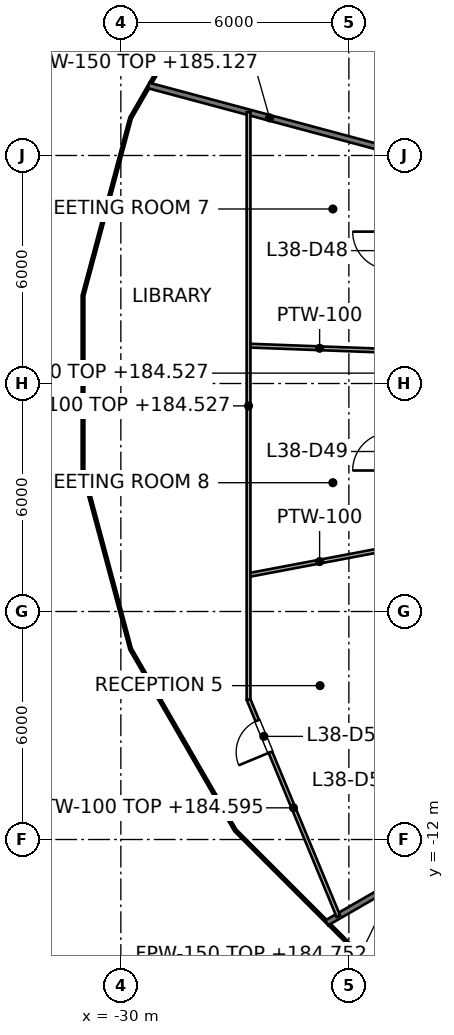
"""IFC4 building model, lengths in metres.
Left out: names, types, materials, properties, quantities, classifications, styles, units other than length and angle.
Written with IfcOpenShell. Run it as: python <this file> out.ifc"""

import sys

from ifc_helpers import new_model, si_unit, direction, frame, frame_2d, origin, place, context, subcontext, project, spatial, rectangle, extrude, element, fill, save


model = new_model("IFC4")
c1 = context("Model", 3, precision=1e-05, world=origin(), true_north=direction((0.0, 1.0)))
c2 = subcontext(c1, "Body", "Model", "MODEL_VIEW")
j1 = project(units=[si_unit("LENGTHUNIT", "METRE"), si_unit("PLANEANGLEUNIT", "RADIAN")], contexts=[c1])
p1 = place(None, origin())
s1 = spatial("IfcSite", under=j1, at=p1, CompositionType="ELEMENT")
p2 = place(p1, origin())
s2 = spatial("IfcBuilding", under=s1, at=p2, CompositionType="ELEMENT")
p3 = place(p2, frame((0.0, 0.0, 181.6)))
s3 = spatial("IfcBuildingStorey", under=s2, at=p3, CompositionType="ELEMENT", Elevation=181.6)
p4 = place(p3, frame((-29.272, 7.843, 0.0), z_axis=(0.0, 0.0, 1.0), x_axis=(0.965939462112, -0.258768150157, 0.0)))
e1 = element("IfcWall", 1, at=p4, inside=s3, PredefinedType="PARTITIONING", context=c2, shape_type="SweptSolid", body=[
    extrude(rectangle(XDim=6.597, YDim=0.15, at=frame_2d((3.298, 0.0))), origin(), (0.0, 0.0, 1.0), 3.527),
])
p5 = place(p3, frame((-24.583, -14.193, 0.0), z_axis=(0.0, 0.0, 1.0), x_axis=(0.866294951489, 0.499532838785, 0.0)))
e2 = element("IfcWall", 2, at=p5, inside=s3, PredefinedType="PARTITIONING", context=c2, shape_type="SweptSolid", body=[
    extrude(rectangle(XDim=4.125, YDim=0.15, at=frame_2d((2.062, 0.0))), origin(), (0.0, 0.0, 1.0), 3.152),
])
p6 = place(p3, frame((-26.64, -8.316, 0.0), z_axis=(0.0, 0.0, 1.0), x_axis=(0.382861877987, -0.923805597723, 0.0)))
e3 = element("IfcWall", 3, at=p6, inside=s3, PredefinedType="PARTITIONING", context=c2, shape_type="SweptSolid", body=[
    extrude(rectangle(XDim=6.171, YDim=0.1, at=frame_2d((3.086, 0.0))), origin(), (0.0, 0.0, 1.0), 2.995),
])
p7 = place(p6, frame((0.6, 0.0, 0.0)))
e4 = element("IfcOpeningElement", 4, at=p7, cuts=e3, PredefinedType="OPENING", context=c2, shape_type="SweptSolid", body=[
    extrude(rectangle(XDim=0.9, YDim=2.1, at=frame_2d((0.45, 1.05))), frame((0.0, 0.05, 0.0), z_axis=(0.0, -1.0, 0.0), x_axis=(1.0, 0.0, 0.0)), (0.0, 0.0, 1.0), 0.1),
])
p8 = place(p3, frame((-26.64, 0.997, 0.0), z_axis=(0.0, 0.0, 1.0), x_axis=(0.999298745045, -0.037443532845, 0.0)))
e5 = element("IfcWall", 5, at=p8, inside=s3, PredefinedType="PARTITIONING", context=c2, shape_type="SweptSolid", body=[
    extrude(rectangle(XDim=3.743, YDim=0.1, at=frame_2d((1.871, 0.0))), origin(), (0.0, 0.0, 1.0), 3.85),
])
p9 = place(p3, frame((-26.64, -5.041, 0.0), z_axis=(0.0, 0.0, 1.0), x_axis=(0.982549025403, 0.186003797485, 0.0)))
e6 = element("IfcWall", 6, at=p9, inside=s3, PredefinedType="PARTITIONING", context=c2, shape_type="SweptSolid", body=[
    extrude(rectangle(XDim=3.806, YDim=0.1, at=frame_2d((1.903, 0.0))), origin(), (0.0, 0.0, 1.0), 3.85),
])
p10 = place(p3, frame((-26.64, -8.316, 0.0), z_axis=(0.0, 0.0, 1.0), x_axis=(0.0, 1.0, 0.0)))
e7 = element("IfcWall", 7, at=p10, inside=s3, PredefinedType="PARTITIONING", context=c2, shape_type="SweptSolid", body=[
    extrude(rectangle(XDim=15.454, YDim=0.1, at=frame_2d((7.727, 0.0))), origin(), (0.0, 0.0, 1.0), 2.927),
])
p11 = place(p7, origin())
e8 = element("IfcDoor", 8, at=p11, inside=s3, OperationType="SINGLE_SWING_RIGHT", PredefinedType="DOOR", context=c2, shape_type="SweptSolid", body=[
    extrude(rectangle(XDim=0.9, YDim=2.1, at=frame_2d((0.45, 1.05))), frame((0.0, 0.025, 0.0), z_axis=(0.0, -1.0, 0.0), x_axis=(1.0, 0.0, 0.0)), (0.0, 0.0, 1.0), 0.05),
])
fill(e4, e8)
save(model, sys.argv[1])
